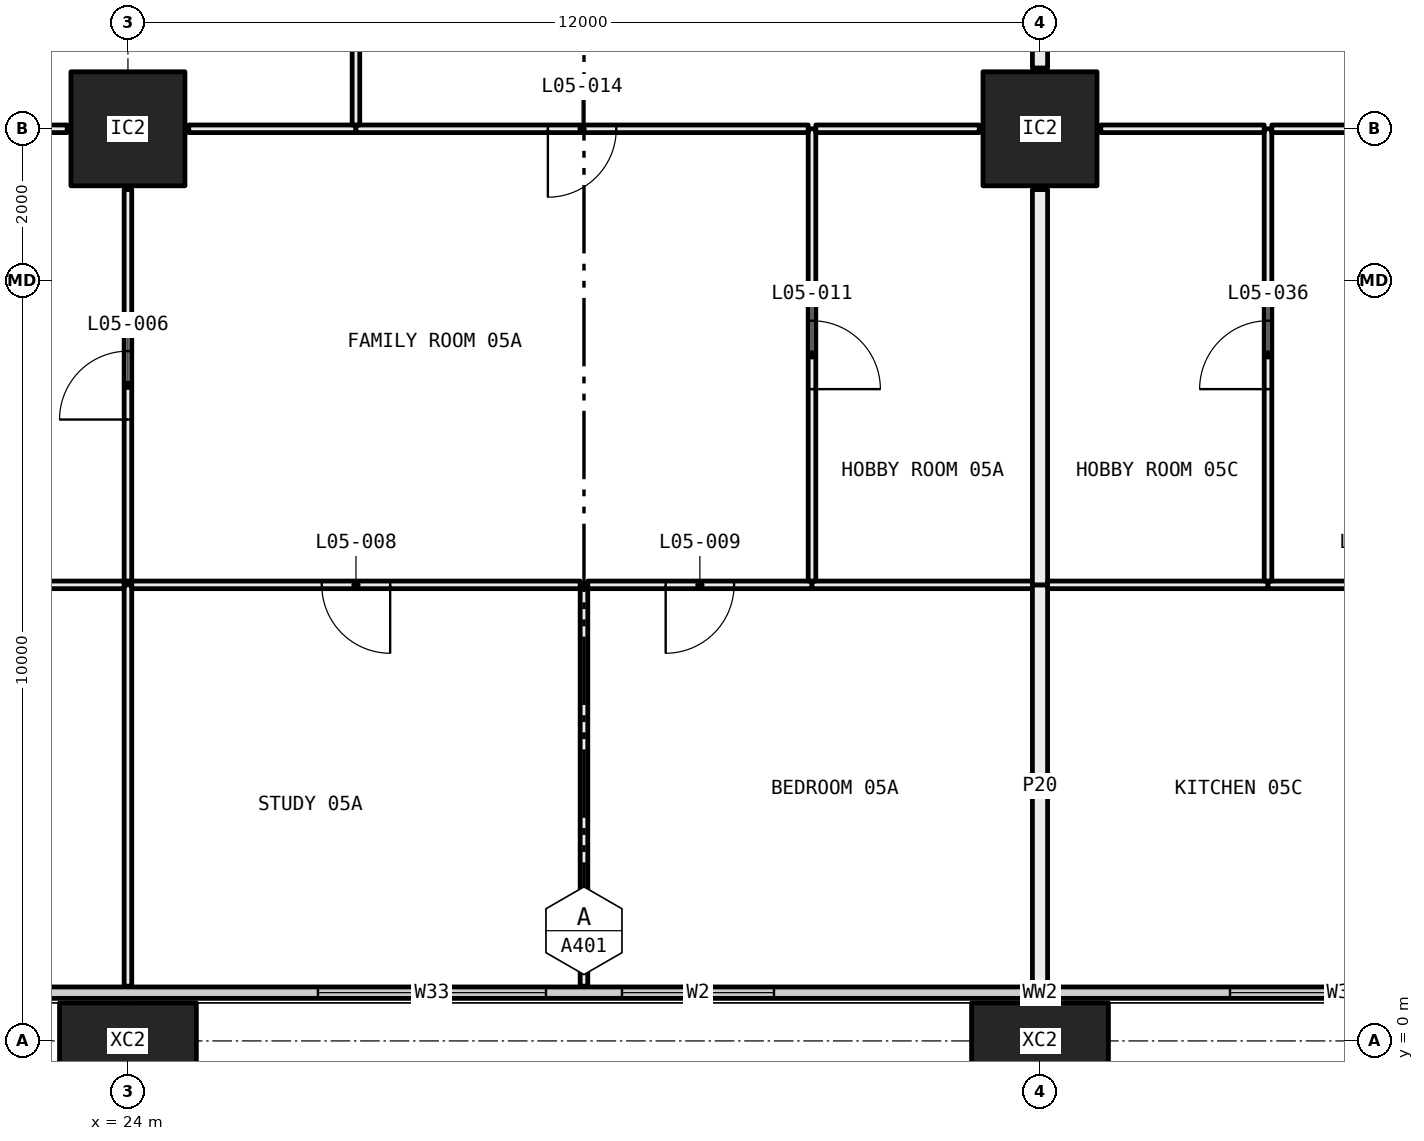
"""IFC4 building model, lengths in metres.
Left out: names, types, materials, properties, quantities, classifications, styles, units other than length and angle.
Written with IfcOpenShell. Run it as: python <this file> out.ifc"""

import sys

from ifc_helpers import new_model, si_unit, direction, frame, frame_2d, origin, origin_2d, place, context, subcontext, project, spatial, rectangle, hollow_rectangle, extrude, element, fill, save


model = new_model("IFC4")
c1 = context("Model", 3, precision=1e-05, world=origin(), true_north=direction((0.0, 1.0)))
c2 = subcontext(c1, "Body", "Model", "MODEL_VIEW")
j1 = project(units=[si_unit("LENGTHUNIT", "METRE"), si_unit("PLANEANGLEUNIT", "RADIAN")], contexts=[c1])
p1 = place(None, origin())
s1 = spatial("IfcSite", under=j1, at=p1, CompositionType="ELEMENT")
p2 = place(p1, origin())
s2 = spatial("IfcBuilding", under=s1, at=p2, CompositionType="ELEMENT")
p3 = place(p2, frame((0.0, 0.0, 30.0)))
s3 = spatial("IfcBuildingStorey", under=s2, at=p3, CompositionType="ELEMENT", Elevation=30.0)
p4 = place(p3, frame((24.0, 0.0, -0.4), z_axis=(0.0, 0.0, 1.0), x_axis=(1.0, 0.0, 0.0)))
e1 = element("IfcColumn", 1, at=p4, inside=s3, PredefinedType="COLUMN", context=c2, shape_type="SweptSolid", body=[
    extrude(hollow_rectangle(XDim=1.8, YDim=1.0, WallThickness=0.07, at=origin_2d()), origin(), (0.0, 0.0, 1.0), 3.45),
])
p5 = place(p3, frame((24.0, 12.0, 0.0), z_axis=(0.0, 0.0, 1.0), x_axis=(1.0, 0.0, 0.0)))
e2 = element("IfcColumn", 2, at=p5, inside=s3, PredefinedType="COLUMN", context=c2, shape_type="SweptSolid", body=[
    extrude(hollow_rectangle(XDim=1.5, YDim=1.5, WallThickness=0.065, at=origin_2d()), origin(), (0.0, 0.0, 1.0), 3.05),
])
p6 = place(p3, frame((36.0, 0.0, -0.4), z_axis=(0.0, 0.0, 1.0), x_axis=(1.0, 0.0, 0.0)))
e3 = element("IfcColumn", 3, at=p6, inside=s3, PredefinedType="COLUMN", context=c2, shape_type="SweptSolid", body=[
    extrude(hollow_rectangle(XDim=1.8, YDim=1.0, WallThickness=0.07, at=origin_2d()), origin(), (0.0, 0.0, 1.0), 3.45),
])
p7 = place(p3, frame((36.0, 12.0, 0.0), z_axis=(0.0, 0.0, 1.0), x_axis=(1.0, 0.0, 0.0)))
e4 = element("IfcColumn", 4, at=p7, inside=s3, PredefinedType="COLUMN", context=c2, shape_type="SweptSolid", body=[
    extrude(hollow_rectangle(XDim=1.5, YDim=1.5, WallThickness=0.065, at=origin_2d()), origin(), (0.0, 0.0, 1.0), 3.05),
])
p8 = place(p3, frame((6.56, 0.635, 0.0), z_axis=(0.0, 0.0, 1.0), x_axis=(1.0, 0.0, 0.0)))
e5 = element("IfcWall", 5, at=p8, inside=s3, PredefinedType="ELEMENTEDWALL", context=c2, shape_type="SweptSolid", body=[
    extrude(rectangle(XDim=58.88, YDim=0.15, at=frame_2d((29.44, 0.0))), origin(), (0.0, 0.0, 1.0), 3.05),
])
p9 = place(p8, frame((0.44, 0.0, 0.45)))
e6 = element("IfcOpeningElement", 6, at=p9, cuts=e5, PredefinedType="OPENING", context=c2, shape_type="SweptSolid", body=[
    extrude(rectangle(XDim=4.5, YDim=2.55, at=frame_2d((2.25, 1.275))), frame((0.0, 0.085, 0.0), z_axis=(0.0, -1.0, 0.0), x_axis=(1.0, 0.0, 0.0)), (0.0, 0.0, 1.0), 0.17),
])
p10 = place(p8, frame((7.94, 0.0, 0.45)))
e7 = element("IfcOpeningElement", 7, at=p10, cuts=e5, PredefinedType="OPENING", context=c2, shape_type="SweptSolid", body=[
    extrude(rectangle(XDim=3.0, YDim=2.55, at=frame_2d((1.5, 1.275))), frame((0.0, 0.085, 0.0), z_axis=(0.0, -1.0, 0.0), x_axis=(1.0, 0.0, 0.0)), (0.0, 0.0, 1.0), 0.17),
])
p11 = place(p8, frame((11.94, 0.0, 0.45)))
e8 = element("IfcOpeningElement", 8, at=p11, cuts=e5, PredefinedType="OPENING", context=c2, shape_type="SweptSolid", body=[
    extrude(rectangle(XDim=3.0, YDim=2.55, at=frame_2d((1.5, 1.275))), frame((0.0, 0.085, 0.0), z_axis=(0.0, -1.0, 0.0), x_axis=(1.0, 0.0, 0.0)), (0.0, 0.0, 1.0), 0.17),
])
p12 = place(p8, frame((19.94, 0.0, 0.45)))
e9 = element("IfcOpeningElement", 9, at=p12, cuts=e5, PredefinedType="OPENING", context=c2, shape_type="SweptSolid", body=[
    extrude(rectangle(XDim=3.0, YDim=2.55, at=frame_2d((1.5, 1.275))), frame((0.0, 0.085, 0.0), z_axis=(0.0, -1.0, 0.0), x_axis=(1.0, 0.0, 0.0)), (0.0, 0.0, 1.0), 0.17),
])
p13 = place(p8, frame((23.94, 0.0, 0.45)))
e10 = element("IfcOpeningElement", 10, at=p13, cuts=e5, PredefinedType="OPENING", context=c2, shape_type="SweptSolid", body=[
    extrude(rectangle(XDim=2.0, YDim=2.55, at=frame_2d((1.0, 1.275))), frame((0.0, 0.085, 0.0), z_axis=(0.0, -1.0, 0.0), x_axis=(1.0, 0.0, 0.0)), (0.0, 0.0, 1.0), 0.17),
])
p14 = place(p8, frame((31.94, 0.0, 0.45)))
e11 = element("IfcOpeningElement", 11, at=p14, cuts=e5, PredefinedType="OPENING", context=c2, shape_type="SweptSolid", body=[
    extrude(rectangle(XDim=3.0, YDim=2.55, at=frame_2d((1.5, 1.275))), frame((0.0, 0.085, 0.0), z_axis=(0.0, -1.0, 0.0), x_axis=(1.0, 0.0, 0.0)), (0.0, 0.0, 1.0), 0.17),
])
p15 = place(p8, frame((35.94, 0.0, 0.45)))
e12 = element("IfcOpeningElement", 12, at=p15, cuts=e5, PredefinedType="OPENING", context=c2, shape_type="SweptSolid", body=[
    extrude(rectangle(XDim=3.0, YDim=2.55, at=frame_2d((1.5, 1.275))), frame((0.0, 0.085, 0.0), z_axis=(0.0, -1.0, 0.0), x_axis=(1.0, 0.0, 0.0)), (0.0, 0.0, 1.0), 0.17),
])
p16 = place(p8, frame((43.94, 0.0, 0.45)))
e13 = element("IfcOpeningElement", 13, at=p16, cuts=e5, PredefinedType="OPENING", context=c2, shape_type="SweptSolid", body=[
    extrude(rectangle(XDim=3.0, YDim=2.55, at=frame_2d((1.5, 1.275))), frame((0.0, 0.085, 0.0), z_axis=(0.0, -1.0, 0.0), x_axis=(1.0, 0.0, 0.0)), (0.0, 0.0, 1.0), 0.17),
])
p17 = place(p8, frame((47.94, 0.0, 0.45)))
e14 = element("IfcOpeningElement", 14, at=p17, cuts=e5, PredefinedType="OPENING", context=c2, shape_type="SweptSolid", body=[
    extrude(rectangle(XDim=2.0, YDim=2.55, at=frame_2d((1.0, 1.275))), frame((0.0, 0.085, 0.0), z_axis=(0.0, -1.0, 0.0), x_axis=(1.0, 0.0, 0.0)), (0.0, 0.0, 1.0), 0.17),
])
p18 = place(p8, frame((53.94, 0.0, 0.45)))
e15 = element("IfcOpeningElement", 15, at=p18, cuts=e5, PredefinedType="OPENING", context=c2, shape_type="SweptSolid", body=[
    extrude(rectangle(XDim=4.5, YDim=2.55, at=frame_2d((2.25, 1.275))), frame((0.0, 0.085, 0.0), z_axis=(0.0, -1.0, 0.0), x_axis=(1.0, 0.0, 0.0)), (0.0, 0.0, 1.0), 0.17),
])
p19 = place(p3, frame((24.0, 0.72, 0.0), z_axis=(0.0, 0.0, 1.0), x_axis=(0.0, 1.0, 0.0)))
e16 = element("IfcWall", 16, at=p19, inside=s3, PredefinedType="PARTITIONING", context=c2, shape_type="SweptSolid", body=[
    extrude(rectangle(XDim=5.28, YDim=0.1, at=frame_2d((2.64, 0.0))), origin(), (0.0, 0.0, 1.0), 2.45),
])
p20 = place(p3, frame((23.95, 6.0, 0.0), z_axis=(0.0, 0.0, 1.0), x_axis=(-1.0, 0.0, 0.0)))
e17 = element("IfcWall", 17, at=p20, inside=s3, PredefinedType="PARTITIONING", context=c2, shape_type="SweptSolid", body=[
    extrude(rectangle(XDim=5.9, YDim=0.1, at=frame_2d((2.95, 0.0))), origin(), (0.0, 0.0, 1.0), 2.45),
])
p21 = place(p20, frame((2.5, 0.0, 0.0)))
e18 = element("IfcOpeningElement", 18, at=p21, cuts=e17, PredefinedType="OPENING", context=c2, shape_type="SweptSolid", body=[
    extrude(rectangle(XDim=0.9, YDim=2.1, at=frame_2d((0.45, 1.05))), frame((0.0, 0.06, 0.0), z_axis=(0.0, -1.0, 0.0), x_axis=(1.0, 0.0, 0.0)), (0.0, 0.0, 1.0), 0.12),
])
p22 = place(p3, frame((30.0, 0.72, 0.0), z_axis=(0.0, 0.0, 1.0), x_axis=(0.0, 1.0, 0.0)))
e19 = element("IfcWall", 19, at=p22, inside=s3, PredefinedType="PARTITIONING", context=c2, shape_type="SweptSolid", body=[
    extrude(rectangle(XDim=5.28, YDim=0.1, at=frame_2d((2.64, 0.0))), origin(), (0.0, 0.0, 1.0), 3.05),
])
p23 = place(p3, frame((29.95, 6.0, 0.0), z_axis=(0.0, 0.0, 1.0), x_axis=(-1.0, 0.0, 0.0)))
e20 = element("IfcWall", 20, at=p23, inside=s3, PredefinedType="PARTITIONING", context=c2, shape_type="SweptSolid", body=[
    extrude(rectangle(XDim=5.9, YDim=0.1, at=frame_2d((2.95, 0.0))), origin(), (0.0, 0.0, 1.0), 2.45),
])
p24 = place(p23, frame((2.5, 0.0, 0.0)))
e21 = element("IfcOpeningElement", 21, at=p24, cuts=e20, PredefinedType="OPENING", context=c2, shape_type="SweptSolid", body=[
    extrude(rectangle(XDim=0.9, YDim=2.1, at=frame_2d((0.45, 1.05))), frame((0.0, 0.06, 0.0), z_axis=(0.0, -1.0, 0.0), x_axis=(1.0, 0.0, 0.0)), (0.0, 0.0, 1.0), 0.12),
])
p25 = place(p3, frame((33.0, 6.0, 0.0), z_axis=(0.0, 0.0, 1.0), x_axis=(-1.0, 0.0, 0.0)))
e22 = element("IfcWall", 22, at=p25, inside=s3, PredefinedType="PARTITIONING", context=c2, shape_type="SweptSolid", body=[
    extrude(rectangle(XDim=2.95, YDim=0.1, at=frame_2d((1.475, 0.0))), origin(), (0.0, 0.0, 1.0), 3.05),
])
p26 = place(p25, frame((1.025, 0.0, 0.0)))
e23 = element("IfcOpeningElement", 23, at=p26, cuts=e22, PredefinedType="OPENING", context=c2, shape_type="SweptSolid", body=[
    extrude(rectangle(XDim=0.9, YDim=2.1, at=frame_2d((0.45, 1.05))), frame((0.0, 0.06, 0.0), z_axis=(0.0, -1.0, 0.0), x_axis=(1.0, 0.0, 0.0)), (0.0, 0.0, 1.0), 0.12),
])
p27 = place(p3, frame((35.9, 6.0, 0.0), z_axis=(0.0, 0.0, 1.0), x_axis=(-1.0, 0.0, 0.0)))
e24 = element("IfcWall", 24, at=p27, inside=s3, PredefinedType="PARTITIONING", context=c2, shape_type="SweptSolid", body=[
    extrude(rectangle(XDim=2.9, YDim=0.1, at=frame_2d((1.45, 0.0))), origin(), (0.0, 0.0, 1.0), 3.05),
])
p28 = place(p3, frame((36.0, 0.72, 0.0), z_axis=(0.0, 0.0, 1.0), x_axis=(0.0, 1.0, 0.0)))
e25 = element("IfcWall", 25, at=p28, inside=s3, PredefinedType="PARTITIONING", context=c2, shape_type="SweptSolid", body=[
    extrude(rectangle(XDim=5.28, YDim=0.2, at=frame_2d((2.64, 0.0))), origin(), (0.0, 0.0, 1.0), 2.45),
])
p29 = place(p3, frame((24.0, 6.05, 0.0), z_axis=(0.0, 0.0, 1.0), x_axis=(0.0, 1.0, 0.0)))
e26 = element("IfcWall", 26, at=p29, inside=s3, PredefinedType="PARTITIONING", context=c2, shape_type="SweptSolid", body=[
    extrude(rectangle(XDim=5.15, YDim=0.1, at=frame_2d((2.575, 0.0))), origin(), (0.0, 0.0, 1.0), 2.45),
])
p30 = place(p29, frame((2.125, 0.0, 0.0)))
e27 = element("IfcOpeningElement", 27, at=p30, cuts=e26, PredefinedType="OPENING", context=c2, shape_type="SweptSolid", body=[
    extrude(rectangle(XDim=0.9, YDim=2.1, at=frame_2d((0.45, 1.05))), frame((0.0, 0.06, 0.0), z_axis=(0.0, -1.0, 0.0), x_axis=(1.0, 0.0, 0.0)), (0.0, 0.0, 1.0), 0.12),
])
p31 = place(p3, frame((23.2, 12.0, 0.0), z_axis=(0.0, 0.0, 1.0), x_axis=(-1.0, 0.0, 0.0)))
e28 = element("IfcWall", 28, at=p31, inside=s3, PredefinedType="PARTITIONING", context=c2, shape_type="SweptSolid", body=[
    extrude(rectangle(XDim=5.2, YDim=0.1, at=frame_2d((2.6, 0.0))), origin(), (0.0, 0.0, 1.0), 2.45),
])
p32 = place(p3, frame((33.0, 6.05, 0.0), z_axis=(0.0, 0.0, 1.0), x_axis=(0.0, 1.0, 0.0)))
e29 = element("IfcWall", 29, at=p32, inside=s3, PredefinedType="PARTITIONING", context=c2, shape_type="SweptSolid", body=[
    extrude(rectangle(XDim=5.95, YDim=0.1, at=frame_2d((2.975, 0.0))), origin(), (0.0, 0.0, 1.0), 2.45),
])
p33 = place(p32, frame((2.525, 0.0, 0.0)))
e30 = element("IfcOpeningElement", 30, at=p33, cuts=e29, PredefinedType="OPENING", context=c2, shape_type="SweptSolid", body=[
    extrude(rectangle(XDim=0.9, YDim=2.1, at=frame_2d((0.45, 1.05))), frame((0.0, 0.06, 0.0), z_axis=(0.0, -1.0, 0.0), x_axis=(1.0, 0.0, 0.0)), (0.0, 0.0, 1.0), 0.12),
])
p34 = place(p3, frame((27.0, 12.0, 0.0), z_axis=(0.0, 0.0, 1.0), x_axis=(-1.0, 0.0, 0.0)))
e31 = element("IfcWall", 31, at=p34, inside=s3, PredefinedType="PARTITIONING", context=c2, shape_type="SweptSolid", body=[
    extrude(rectangle(XDim=2.2, YDim=0.1, at=frame_2d((1.1, 0.0))), origin(), (0.0, 0.0, 1.0), 2.45),
])
p35 = place(p3, frame((32.95, 12.0, 0.0), z_axis=(0.0, 0.0, 1.0), x_axis=(-1.0, 0.0, 0.0)))
e32 = element("IfcWall", 32, at=p35, inside=s3, PredefinedType="PARTITIONING", context=c2, shape_type="SweptSolid", body=[
    extrude(rectangle(XDim=5.95, YDim=0.1, at=frame_2d((2.975, 0.0))), origin(), (0.0, 0.0, 1.0), 2.45),
])
p36 = place(p35, frame((2.525, 0.0, 0.0)))
e33 = element("IfcOpeningElement", 33, at=p36, cuts=e32, PredefinedType="OPENING", context=c2, shape_type="SweptSolid", body=[
    extrude(rectangle(XDim=0.9, YDim=2.1, at=frame_2d((0.45, 1.05))), frame((0.0, 0.06, 0.0), z_axis=(0.0, -1.0, 0.0), x_axis=(1.0, 0.0, 0.0)), (0.0, 0.0, 1.0), 0.12),
])
p37 = place(p3, frame((35.2, 12.0, 0.0), z_axis=(0.0, 0.0, 1.0), x_axis=(-1.0, 0.0, 0.0)))
e34 = element("IfcWall", 34, at=p37, inside=s3, PredefinedType="PARTITIONING", context=c2, shape_type="SweptSolid", body=[
    extrude(rectangle(XDim=2.15, YDim=0.1, at=frame_2d((1.075, 0.0))), origin(), (0.0, 0.0, 1.0), 2.45),
])
p38 = place(p3, frame((36.0, 6.0, 0.0), z_axis=(0.0, 0.0, 1.0), x_axis=(0.0, 1.0, 0.0)))
e35 = element("IfcWall", 35, at=p38, inside=s3, PredefinedType="PARTITIONING", context=c2, shape_type="SweptSolid", body=[
    extrude(rectangle(XDim=5.2, YDim=0.2, at=frame_2d((2.6, 0.0))), origin(), (0.0, 0.0, 1.0), 2.45),
])
p39 = place(p3, frame((27.0, 12.05, 0.0), z_axis=(0.0, 0.0, 1.0), x_axis=(0.0, 1.0, 0.0)))
e36 = element("IfcWall", 36, at=p39, inside=s3, PredefinedType="PARTITIONING", context=c2, shape_type="SweptSolid", body=[
    extrude(rectangle(XDim=5.95, YDim=0.1, at=frame_2d((2.975, 0.0))), origin(), (0.0, 0.0, 1.0), 2.45),
])
p40 = place(p3, frame((36.0, 12.8, 0.0), z_axis=(0.0, 0.0, 1.0), x_axis=(0.0, 1.0, 0.0)))
e37 = element("IfcWall", 37, at=p40, inside=s3, PredefinedType="PARTITIONING", context=c2, shape_type="SweptSolid", body=[
    extrude(rectangle(XDim=5.2, YDim=0.2, at=frame_2d((2.6, 0.0))), origin(), (0.0, 0.0, 1.0), 2.45),
])
p41 = place(p3, frame((39.0, 6.0, 0.0), z_axis=(0.0, 0.0, 1.0), x_axis=(-1.0, 0.0, 0.0)))
e38 = element("IfcWall", 38, at=p41, inside=s3, PredefinedType="PARTITIONING", context=c2, shape_type="SweptSolid", body=[
    extrude(rectangle(XDim=2.9, YDim=0.1, at=frame_2d((1.45, 0.0))), origin(), (0.0, 0.0, 1.0), 3.05),
])
p42 = place(p3, frame((41.95, 6.0, 0.0), z_axis=(0.0, 0.0, 1.0), x_axis=(-1.0, 0.0, 0.0)))
e39 = element("IfcWall", 39, at=p42, inside=s3, PredefinedType="PARTITIONING", context=c2, shape_type="SweptSolid", body=[
    extrude(rectangle(XDim=2.95, YDim=0.1, at=frame_2d((1.475, 0.0))), origin(), (0.0, 0.0, 1.0), 3.05),
])
p43 = place(p42, frame((1.025, 0.0, 0.0)))
e40 = element("IfcOpeningElement", 40, at=p43, cuts=e39, PredefinedType="OPENING", context=c2, shape_type="SweptSolid", body=[
    extrude(rectangle(XDim=0.9, YDim=2.1, at=frame_2d((0.45, 1.05))), frame((0.0, 0.06, 0.0), z_axis=(0.0, -1.0, 0.0), x_axis=(1.0, 0.0, 0.0)), (0.0, 0.0, 1.0), 0.12),
])
p44 = place(p3, frame((39.0, 6.05, 0.0), z_axis=(0.0, 0.0, 1.0), x_axis=(0.0, 1.0, 0.0)))
e41 = element("IfcWall", 41, at=p44, inside=s3, PredefinedType="PARTITIONING", context=c2, shape_type="SweptSolid", body=[
    extrude(rectangle(XDim=5.95, YDim=0.1, at=frame_2d((2.975, 0.0))), origin(), (0.0, 0.0, 1.0), 2.45),
])
p45 = place(p44, frame((2.525, 0.0, 0.0)))
e42 = element("IfcOpeningElement", 42, at=p45, cuts=e41, PredefinedType="OPENING", context=c2, shape_type="SweptSolid", body=[
    extrude(rectangle(XDim=0.9, YDim=2.1, at=frame_2d((0.45, 1.05))), frame((0.0, 0.06, 0.0), z_axis=(0.0, -1.0, 0.0), x_axis=(1.0, 0.0, 0.0)), (0.0, 0.0, 1.0), 0.12),
])
p46 = place(p3, frame((38.95, 12.0, 0.0), z_axis=(0.0, 0.0, 1.0), x_axis=(-1.0, 0.0, 0.0)))
e43 = element("IfcWall", 43, at=p46, inside=s3, PredefinedType="PARTITIONING", context=c2, shape_type="SweptSolid", body=[
    extrude(rectangle(XDim=2.15, YDim=0.1, at=frame_2d((1.075, 0.0))), origin(), (0.0, 0.0, 1.0), 2.45),
])
p47 = place(p3, frame((43.5, 12.0, 0.0), z_axis=(0.0, 0.0, 1.0), x_axis=(-1.0, 0.0, 0.0)))
e44 = element("IfcWall", 44, at=p47, inside=s3, PredefinedType="PARTITIONING", context=c2, shape_type="SweptSolid", body=[
    extrude(rectangle(XDim=4.45, YDim=0.1, at=frame_2d((2.225, 0.0))), origin(), (0.0, 0.0, 1.0), 2.45),
])
p48 = place(p47, frame((1.775, 0.0, 0.0)))
e45 = element("IfcOpeningElement", 45, at=p48, cuts=e44, PredefinedType="OPENING", context=c2, shape_type="SweptSolid", body=[
    extrude(rectangle(XDim=0.9, YDim=2.1, at=frame_2d((0.45, 1.05))), frame((0.0, 0.06, 0.0), z_axis=(0.0, -1.0, 0.0), x_axis=(1.0, 0.0, 0.0)), (0.0, 0.0, 1.0), 0.12),
])
p49 = place(p12, origin())
e46 = element("IfcWindow", 46, at=p49, inside=s3, PartitioningType="SINGLE_PANEL", PredefinedType="WINDOW", context=c2, shape_type="SweptSolid", body=[
    extrude(rectangle(XDim=3.0, YDim=2.55, at=frame_2d((1.5, 1.275))), frame((0.0, 0.03, 0.0), z_axis=(0.0, -1.0, 0.0), x_axis=(1.0, 0.0, 0.0)), (0.0, 0.0, 1.0), 0.06),
])
fill(e9, e46)
p50 = place(p13, origin())
e47 = element("IfcWindow", 47, at=p50, inside=s3, PartitioningType="SINGLE_PANEL", PredefinedType="WINDOW", context=c2, shape_type="SweptSolid", body=[
    extrude(rectangle(XDim=2.0, YDim=2.55, at=frame_2d((1.0, 1.275))), frame((0.0, 0.03, 0.0), z_axis=(0.0, -1.0, 0.0), x_axis=(1.0, 0.0, 0.0)), (0.0, 0.0, 1.0), 0.06),
])
fill(e10, e47)
p51 = place(p14, origin())
e48 = element("IfcWindow", 48, at=p51, inside=s3, PartitioningType="SINGLE_PANEL", PredefinedType="WINDOW", context=c2, shape_type="SweptSolid", body=[
    extrude(rectangle(XDim=3.0, YDim=2.55, at=frame_2d((1.5, 1.275))), frame((0.0, 0.03, 0.0), z_axis=(0.0, -1.0, 0.0), x_axis=(1.0, 0.0, 0.0)), (0.0, 0.0, 1.0), 0.06),
])
fill(e11, e48)
p52 = place(p30, origin())
e49 = element("IfcDoor", 49, at=p52, inside=s3, OperationType="SINGLE_SWING_RIGHT", PredefinedType="DOOR", context=c2, shape_type="SweptSolid", body=[
    extrude(rectangle(XDim=0.9, YDim=2.1, at=frame_2d((0.45, 1.05))), frame((0.0, 0.025, 0.0), z_axis=(0.0, -1.0, 0.0), x_axis=(1.0, 0.0, 0.0)), (0.0, 0.0, 1.0), 0.05),
])
fill(e27, e49)
p53 = place(p24, origin())
e50 = element("IfcDoor", 50, at=p53, inside=s3, OperationType="SINGLE_SWING_RIGHT", PredefinedType="DOOR", context=c2, shape_type="SweptSolid", body=[
    extrude(rectangle(XDim=0.9, YDim=2.1, at=frame_2d((0.45, 1.05))), frame((0.0, 0.025, 0.0), z_axis=(0.0, -1.0, 0.0), x_axis=(1.0, 0.0, 0.0)), (0.0, 0.0, 1.0), 0.05),
])
fill(e21, e50)
p54 = place(p26, origin())
e51 = element("IfcDoor", 51, at=p54, inside=s3, OperationType="SINGLE_SWING_LEFT", PredefinedType="DOOR", context=c2, shape_type="SweptSolid", body=[
    extrude(rectangle(XDim=0.9, YDim=2.1, at=frame_2d((0.45, 1.05))), frame((0.0, 0.025, 0.0), z_axis=(0.0, -1.0, 0.0), x_axis=(1.0, 0.0, 0.0)), (0.0, 0.0, 1.0), 0.05),
])
fill(e23, e51)
p55 = place(p33, frame((0.9, 0.0, 0.0), x_axis=(-1.0, 0.0, 0.0)))
e52 = element("IfcDoor", 52, at=p55, inside=s3, OperationType="SINGLE_SWING_LEFT", PredefinedType="DOOR", context=c2, shape_type="SweptSolid", body=[
    extrude(rectangle(XDim=0.9, YDim=2.1, at=frame_2d((0.45, 1.05))), frame((0.0, 0.025, 0.0), z_axis=(0.0, -1.0, 0.0), x_axis=(1.0, 0.0, 0.0)), (0.0, 0.0, 1.0), 0.05),
])
fill(e30, e52)
p56 = place(p36, origin())
e53 = element("IfcDoor", 53, at=p56, inside=s3, OperationType="SINGLE_SWING_LEFT", PredefinedType="DOOR", context=c2, shape_type="SweptSolid", body=[
    extrude(rectangle(XDim=0.9, YDim=2.1, at=frame_2d((0.45, 1.05))), frame((0.0, 0.025, 0.0), z_axis=(0.0, -1.0, 0.0), x_axis=(1.0, 0.0, 0.0)), (0.0, 0.0, 1.0), 0.05),
])
fill(e33, e53)
p57 = place(p45, origin())
e54 = element("IfcDoor", 54, at=p57, inside=s3, OperationType="SINGLE_SWING_RIGHT", PredefinedType="DOOR", context=c2, shape_type="SweptSolid", body=[
    extrude(rectangle(XDim=0.9, YDim=2.1, at=frame_2d((0.45, 1.05))), frame((0.0, 0.025, 0.0), z_axis=(0.0, -1.0, 0.0), x_axis=(1.0, 0.0, 0.0)), (0.0, 0.0, 1.0), 0.05),
])
fill(e42, e54)
save(model, sys.argv[1])
